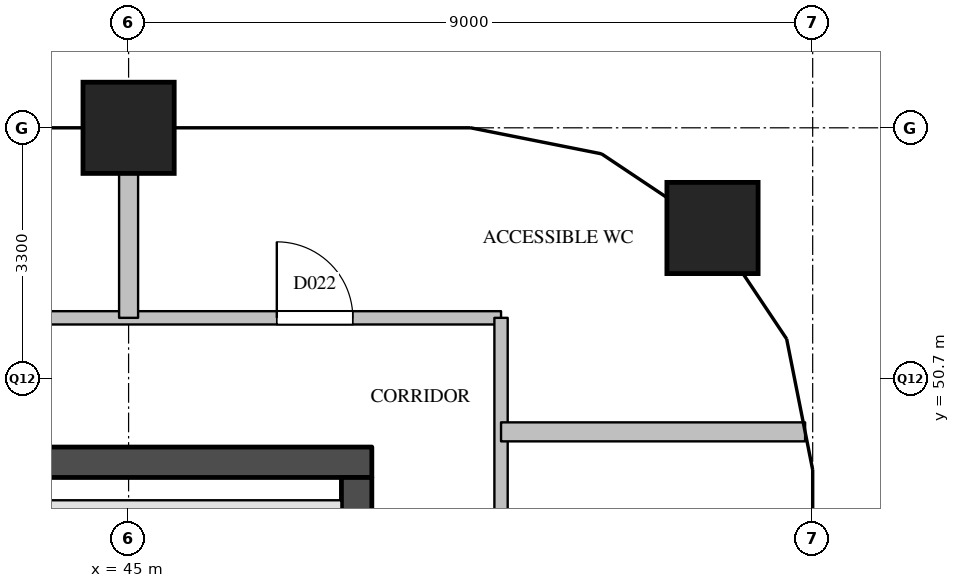
"""IFC4 building model, lengths in metres.
Left out: names, types, materials, properties, quantities, classifications, styles, units other than length and angle.
Written with IfcOpenShell. Run it as: python <this file> out.ifc"""

import sys

from ifc_helpers import new_model, si_unit, direction, frame, frame_2d, origin, origin_2d, place, context, subcontext, project, spatial, rectangle, extrude, element, fill, save


model = new_model("IFC4")
c1 = context("Model", 3, precision=1e-05, world=origin(), true_north=direction((0.0, 1.0)))
c2 = subcontext(c1, "Body", "Model", "MODEL_VIEW")
j1 = project(units=[si_unit("LENGTHUNIT", "METRE"), si_unit("PLANEANGLEUNIT", "RADIAN")], contexts=[c1])
p1 = place(None, origin())
s1 = spatial("IfcSite", under=j1, at=p1, CompositionType="ELEMENT")
p2 = place(p1, origin())
s2 = spatial("IfcBuilding", under=s1, at=p2, CompositionType="ELEMENT")
p3 = place(p2, frame((0.0, 0.0, 242.3)))
s3 = spatial("IfcBuildingStorey", under=s2, at=p3, CompositionType="ELEMENT", Elevation=242.3)
for number, where, z_axis, x_axis in (
    (1, (45.0, 54.0, 0.0), (0.0, 0.0, 1.0), (1.0, 0.0, 0.0)),
    (2, (52.682, 52.682, 0.0), (0.0, 0.0, 1.0), (1.0, 0.0, 0.0)),
):
    element("IfcColumn", number, at=place(p3, frame(where, z_axis=z_axis, x_axis=x_axis)), inside=s3, PredefinedType="COLUMN", context=c2, shape_type="SweptSolid", body=[
        extrude(rectangle(XDim=1.2, YDim=1.2, at=origin_2d()), origin(), (0.0, 0.0, 1.0), 3.9),
    ])
p4 = place(p3, frame((36.2, 49.6, 0.0), z_axis=(0.0, 0.0, 1.0), x_axis=(1.0, 0.0, 0.0)))
e3 = element("IfcWall", 3, at=p4, inside=s3, PredefinedType="SHEAR", context=c2, shape_type="SweptSolid", body=[
    extrude(rectangle(XDim=12.0, YDim=0.4, at=frame_2d((6.0, 0.0))), origin(), (0.0, 0.0, 1.0), 3.6),
])
p5 = place(p3, frame((48.0, 29.1, 0.0), z_axis=(0.0, 0.0, 1.0), x_axis=(0.0, 1.0, 0.0)))
e4 = element("IfcWall", 4, at=p5, inside=s3, PredefinedType="SHEAR", context=c2, shape_type="SweptSolid", body=[
    extrude(rectangle(XDim=20.3, YDim=0.4, at=frame_2d((10.15, 0.0))), origin(), (0.0, 0.0, 1.0), 3.6),
])
p6 = place(p5, frame((12.5, 0.0, 0.0)))
e5 = element("IfcOpeningElement", 5, at=p6, cuts=e4, PredefinedType="OPENING", context=c2, shape_type="SweptSolid", body=[
    extrude(rectangle(XDim=0.7, YDim=2.1, at=frame_2d((0.35, 1.05))), frame((0.0, 0.21, 0.0), z_axis=(0.0, -1.0, 0.0), x_axis=(1.0, 0.0, 0.0)), (0.0, 0.0, 1.0), 0.42),
])
p7 = place(p5, frame((3.9, 0.0, 0.0)))
e6 = element("IfcOpeningElement", 6, at=p7, cuts=e4, PredefinedType="OPENING", context=c2, shape_type="SweptSolid", body=[
    extrude(rectangle(XDim=1.8, YDim=2.1, at=frame_2d((0.9, 1.05))), frame((0.0, 0.21, 0.0), z_axis=(0.0, -1.0, 0.0), x_axis=(1.0, 0.0, 0.0)), (0.0, 0.0, 1.0), 0.42),
])
p8 = place(p3, frame((45.0, 46.8, 0.0), z_axis=(0.0, 0.0, 1.0), x_axis=(0.0, 1.0, 0.0)))
e7 = element("IfcWall", 7, at=p8, inside=s3, PredefinedType="PARTITIONING", context=c2, shape_type="SweptSolid", body=[
    extrude(rectangle(XDim=2.2, YDim=0.2, at=frame_2d((1.1, 0.0))), origin(), (0.0, 0.0, 1.0), 3.6),
])
p9 = place(p3, frame((36.6, 49.0, 0.0), z_axis=(0.0, 0.0, 1.0), x_axis=(1.0, 0.0, 0.0)))
e8 = element("IfcWall", 8, at=p9, inside=s3, PredefinedType="PARTITIONING", context=c2, shape_type="SweptSolid", body=[
    extrude(rectangle(XDim=11.2, YDim=0.2, at=frame_2d((5.6, 0.0))), origin(), (0.0, 0.0, 1.0), 3.6),
])
p10 = place(p3, frame((34.5, 51.5, 0.0), z_axis=(0.0, 0.0, 1.0), x_axis=(1.0, 0.0, 0.0)))
e9 = element("IfcWall", 9, at=p10, inside=s3, PredefinedType="PARTITIONING", context=c2, shape_type="SweptSolid", body=[
    extrude(rectangle(XDim=15.4, YDim=0.175, at=frame_2d((7.7, 0.0))), origin(), (0.0, 0.0, 1.0), 3.6),
])
p11 = place(p10, frame((12.45, 0.0, 0.0)))
e10 = element("IfcOpeningElement", 10, at=p11, cuts=e9, PredefinedType="OPENING", context=c2, shape_type="SweptSolid", body=[
    extrude(rectangle(XDim=1.0, YDim=2.1, at=frame_2d((0.5, 1.05))), frame((0.0, 0.097, 0.0), z_axis=(0.0, -1.0, 0.0), x_axis=(1.0, 0.0, 0.0)), (0.0, 0.0, 1.0), 0.195),
])
p12 = place(p10, frame((5.05, 0.0, 0.0)))
e11 = element("IfcOpeningElement", 11, at=p12, cuts=e9, PredefinedType="OPENING", context=c2, shape_type="SweptSolid", body=[
    extrude(rectangle(XDim=0.9, YDim=2.1, at=frame_2d((0.45, 1.05))), frame((0.0, 0.097, 0.0), z_axis=(0.0, -1.0, 0.0), x_axis=(1.0, 0.0, 0.0)), (0.0, 0.0, 1.0), 0.195),
])
p13 = place(p3, frame((49.9, 28.5, 0.0), z_axis=(0.0, 0.0, 1.0), x_axis=(0.0, 1.0, 0.0)))
e12 = element("IfcWall", 12, at=p13, inside=s3, PredefinedType="PARTITIONING", context=c2, shape_type="SweptSolid", body=[
    extrude(rectangle(XDim=23.0, YDim=0.175, at=frame_2d((11.5, 0.0))), origin(), (0.0, 0.0, 1.0), 3.6),
])
p14 = place(p13, frame((5.3, 0.0, 0.0)))
e13 = element("IfcOpeningElement", 13, at=p14, cuts=e12, PredefinedType="OPENING", context=c2, shape_type="SweptSolid", body=[
    extrude(rectangle(XDim=0.9, YDim=2.1, at=frame_2d((0.45, 1.05))), frame((0.0, 0.097, 0.0), z_axis=(0.0, -1.0, 0.0), x_axis=(1.0, 0.0, 0.0)), (0.0, 0.0, 1.0), 0.195),
])
p15 = place(p13, frame((16.05, 0.0, 0.0)))
e14 = element("IfcOpeningElement", 14, at=p15, cuts=e12, PredefinedType="OPENING", context=c2, shape_type="SweptSolid", body=[
    extrude(rectangle(XDim=0.9, YDim=2.1, at=frame_2d((0.45, 1.05))), frame((0.0, 0.097, 0.0), z_axis=(0.0, -1.0, 0.0), x_axis=(1.0, 0.0, 0.0)), (0.0, 0.0, 1.0), 0.195),
])
p16 = place(p3, frame((49.9, 50.0, 0.0), z_axis=(0.0, 0.0, 1.0), x_axis=(1.0, 0.0, 0.0)))
e15 = element("IfcWall", 15, at=p16, inside=s3, PredefinedType="PARTITIONING", context=c2, shape_type="SweptSolid", body=[
    extrude(rectangle(XDim=4.0, YDim=0.25, at=frame_2d((2.0, 0.0))), origin(), (0.0, 0.0, 1.0), 2.6),
])
p17 = place(p3, frame((45.0, 51.5, 0.0), z_axis=(0.0, 0.0, 1.0), x_axis=(0.0, 1.0, 0.0)))
e16 = element("IfcWall", 16, at=p17, inside=s3, PredefinedType="PARTITIONING", context=c2, shape_type="SweptSolid", body=[
    extrude(rectangle(XDim=2.5, YDim=0.25, at=frame_2d((1.25, 0.0))), origin(), (0.0, 0.0, 1.0), 3.6),
])
p18 = place(p11, origin())
e17 = element("IfcDoor", 17, at=p18, inside=s3, OperationType="SINGLE_SWING_LEFT", PredefinedType="DOOR", context=c2, shape_type="SweptSolid", body=[
    extrude(rectangle(XDim=1.0, YDim=2.1, at=frame_2d((0.5, 1.05))), frame((0.0, 0.025, 0.0), z_axis=(0.0, -1.0, 0.0), x_axis=(1.0, 0.0, 0.0)), (0.0, 0.0, 1.0), 0.05),
])
fill(e10, e17)
save(model, sys.argv[1])
